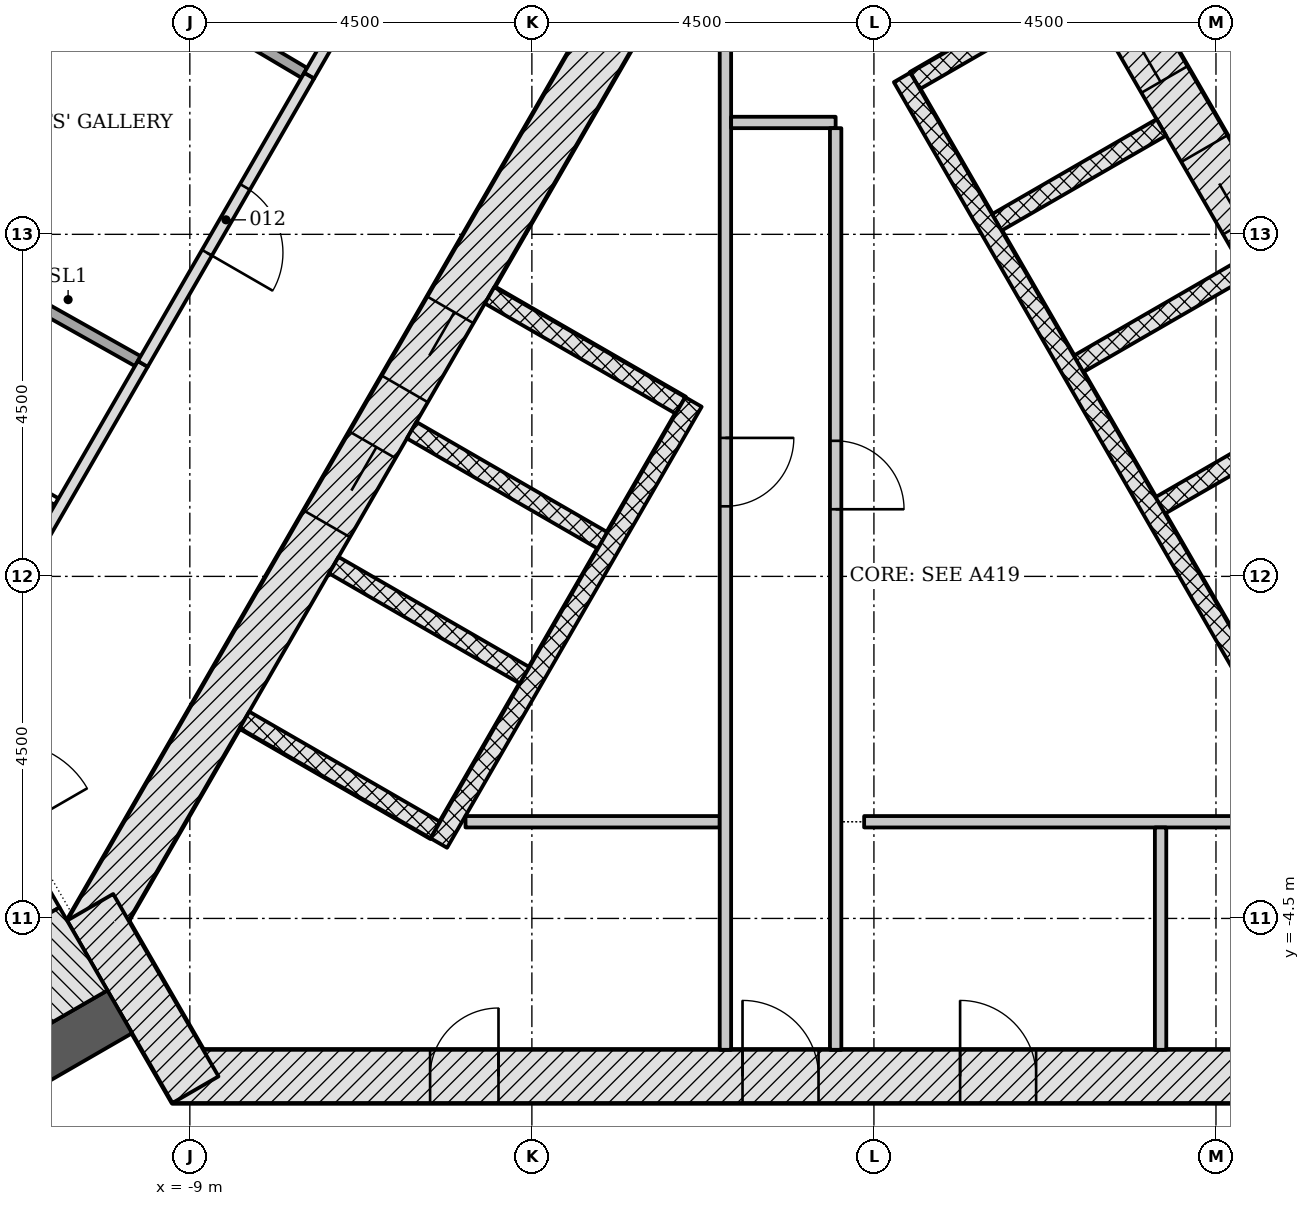
"""IFC4 building model, lengths in metres.
Left out: names, types, materials, properties, quantities, classifications, styles, units other than length and angle.
Written with IfcOpenShell. Run it as: python <this file> out.ifc"""

import sys

from ifc_helpers import new_model, si_unit, direction, frame, frame_2d, origin, place, context, subcontext, project, spatial, rectangle, extrude, element, fill, save


model = new_model("IFC4")
c1 = context("Model", 3, precision=1e-05, world=origin(), true_north=direction((0.0, 1.0)))
c2 = subcontext(c1, "Body", "Model", "MODEL_VIEW")
j1 = project(units=[si_unit("LENGTHUNIT", "METRE"), si_unit("PLANEANGLEUNIT", "RADIAN")], contexts=[c1])
p1 = place(None, origin())
s1 = spatial("IfcSite", under=j1, at=p1, CompositionType="ELEMENT")
p2 = place(p1, origin())
s2 = spatial("IfcBuilding", under=s1, at=p2, CompositionType="ELEMENT")
p3 = place(p2, frame((0.0, 0.0, 232.8)))
s3 = spatial("IfcBuildingStorey", under=s2, at=p3, CompositionType="ELEMENT", Elevation=232.8)
p4 = place(p3, frame((-9.229, -6.578, -0.2), z_axis=(0.0, 0.0, 1.0), x_axis=(1.0, 0.0, 0.0)))
e1 = element("IfcWall", 1, at=p4, inside=s3, PredefinedType="SHEAR", context=c2, shape_type="SweptSolid", body=[
    extrude(rectangle(XDim=18.458, YDim=0.7, at=frame_2d((9.229, 0.0))), origin(), (0.0, 0.0, 1.0), 3.6),
])
p5 = place(p4, frame((7.5, 0.0, 0.2)))
e2 = element("IfcOpeningElement", 2, at=p5, cuts=e1, PredefinedType="OPENING", context=c2, shape_type="SweptSolid", body=[
    extrude(rectangle(XDim=1.0, YDim=2.1, at=frame_2d((0.5, 1.05))), frame((0.0, 0.36, 0.0), z_axis=(0.0, -1.0, 0.0), x_axis=(1.0, 0.0, 0.0)), (0.0, 0.0, 1.0), 0.72),
])
p6 = place(p4, frame((3.389, 0.0, 0.2)))
e3 = element("IfcOpeningElement", 3, at=p6, cuts=e1, PredefinedType="OPENING", context=c2, shape_type="SweptSolid", body=[
    extrude(rectangle(XDim=0.9, YDim=2.1, at=frame_2d((0.45, 1.05))), frame((0.0, 0.36, 0.0), z_axis=(0.0, -1.0, 0.0), x_axis=(1.0, 0.0, 0.0)), (0.0, 0.0, 1.0), 0.72),
])
p7 = place(p4, frame((10.363, 0.0, 0.2)))
e4 = element("IfcOpeningElement", 4, at=p7, cuts=e1, PredefinedType="OPENING", context=c2, shape_type="SweptSolid", body=[
    extrude(rectangle(XDim=1.0, YDim=2.1, at=frame_2d((0.5, 1.05))), frame((0.0, 0.36, 0.0), z_axis=(0.0, -1.0, 0.0), x_axis=(1.0, 0.0, 0.0)), (0.0, 0.0, 1.0), 0.72),
])
p8 = place(p4, frame((15.077, 0.0, 0.2)))
e5 = element("IfcOpeningElement", 5, at=p8, cuts=e1, PredefinedType="OPENING", context=c2, shape_type="SweptSolid", body=[
    extrude(rectangle(XDim=0.9, YDim=2.1, at=frame_2d((0.45, 1.05))), frame((0.0, 0.36, 0.0), z_axis=(0.0, -1.0, 0.0), x_axis=(1.0, 0.0, 0.0)), (0.0, 0.0, 1.0), 0.72),
])
p9 = place(p3, frame((10.311, -4.703, -0.2), z_axis=(0.0, 0.0, 1.0), x_axis=(-0.500001446645, 0.866024568562, 0.0)))
e6 = element("IfcWall", 6, at=p9, inside=s3, PredefinedType="SHEAR", context=c2, shape_type="SweptSolid", body=[
    extrude(rectangle(XDim=18.458, YDim=0.7, at=frame_2d((9.229, 0.0))), origin(), (0.0, 0.0, 1.0), 3.6),
])
p10 = place(p9, frame((4.379, 0.0, 0.2)))
e7 = element("IfcOpeningElement", 7, at=p10, cuts=e6, PredefinedType="OPENING", context=c2, shape_type="SweptSolid", body=[
    extrude(rectangle(XDim=1.1, YDim=2.1, at=frame_2d((0.55, 1.05))), frame((0.0, 0.36, 0.0), z_axis=(0.0, -1.0, 0.0), x_axis=(1.0, 0.0, 0.0)), (0.0, 0.0, 1.0), 0.72),
])
p11 = place(p9, frame((6.529, 0.0, 0.2)))
e8 = element("IfcOpeningElement", 8, at=p11, cuts=e6, PredefinedType="OPENING", context=c2, shape_type="SweptSolid", body=[
    extrude(rectangle(XDim=1.1, YDim=2.1, at=frame_2d((0.55, 1.05))), frame((0.0, 0.36, 0.0), z_axis=(0.0, -1.0, 0.0), x_axis=(1.0, 0.0, 0.0)), (0.0, 0.0, 1.0), 0.72),
])
p12 = place(p9, frame((8.679, 0.0, 0.2)))
e9 = element("IfcOpeningElement", 9, at=p12, cuts=e6, PredefinedType="OPENING", context=c2, shape_type="SweptSolid", body=[
    extrude(rectangle(XDim=1.1, YDim=2.1, at=frame_2d((0.55, 1.05))), frame((0.0, 0.36, 0.0), z_axis=(0.0, -1.0, 0.0), x_axis=(1.0, 0.0, 0.0)), (0.0, 0.0, 1.0), 0.72),
])
p13 = place(p9, frame((10.829, 0.0, 0.2)))
e10 = element("IfcOpeningElement", 10, at=p13, cuts=e6, PredefinedType="OPENING", context=c2, shape_type="SweptSolid", body=[
    extrude(rectangle(XDim=1.1, YDim=2.1, at=frame_2d((0.55, 1.05))), frame((0.0, 0.36, 0.0), z_axis=(0.0, -1.0, 0.0), x_axis=(1.0, 0.0, 0.0)), (0.0, 0.0, 1.0), 0.72),
])
p14 = place(p9, frame((12.979, 0.0, 0.2)))
e11 = element("IfcOpeningElement", 11, at=p14, cuts=e6, PredefinedType="OPENING", context=c2, shape_type="SweptSolid", body=[
    extrude(rectangle(XDim=1.1, YDim=2.1, at=frame_2d((0.55, 1.05))), frame((0.0, 0.36, 0.0), z_axis=(0.0, -1.0, 0.0), x_axis=(1.0, 0.0, 0.0)), (0.0, 0.0, 1.0), 0.72),
])
p15 = place(p3, frame((-1.083, 11.281, -0.2), z_axis=(0.0, 0.0, 1.0), x_axis=(-0.500001446645, -0.866024568562, 0.0)))
e12 = element("IfcWall", 12, at=p15, inside=s3, PredefinedType="SHEAR", context=c2, shape_type="SweptSolid", body=[
    extrude(rectangle(XDim=18.458, YDim=0.7, at=frame_2d((9.229, 0.0))), origin(), (0.0, 0.0, 1.0), 3.6),
])
p16 = place(p15, frame((8.979, 0.0, 0.2)))
e13 = element("IfcOpeningElement", 13, at=p16, cuts=e12, PredefinedType="OPENING", context=c2, shape_type="SweptSolid", body=[
    extrude(rectangle(XDim=1.2, YDim=2.1, at=frame_2d((0.6, 1.05))), frame((0.0, 0.36, 0.0), z_axis=(0.0, -1.0, 0.0), x_axis=(1.0, 0.0, 0.0)), (0.0, 0.0, 1.0), 0.72),
])
p17 = place(p15, frame((11.029, 0.0, 0.2)))
e14 = element("IfcOpeningElement", 14, at=p17, cuts=e12, PredefinedType="OPENING", context=c2, shape_type="SweptSolid", body=[
    extrude(rectangle(XDim=1.2, YDim=2.1, at=frame_2d((0.6, 1.05))), frame((0.0, 0.36, 0.0), z_axis=(0.0, -1.0, 0.0), x_axis=(1.0, 0.0, 0.0)), (0.0, 0.0, 1.0), 0.72),
])
p18 = place(p3, frame((-10.311, -4.353, -0.2), z_axis=(0.0, 0.0, 1.0), x_axis=(0.500042739161, -0.866000726912, 0.0)))
e15 = element("IfcWall", 15, at=p18, inside=s3, PredefinedType="SHEAR", context=c2, shape_type="SweptSolid", body=[
    extrude(rectangle(XDim=2.771, YDim=0.7, at=frame_2d((1.386, 0.0))), origin(), (0.0, 0.0, 1.0), 3.6),
])
p19 = place(p3, frame((-9.922, -5.728, -0.2), z_axis=(0.0, 0.0, 1.0), x_axis=(-0.866026891245, -0.499997423634, 0.0)))
e16 = element("IfcWall", 16, at=p19, inside=s3, PredefinedType="SHEAR", context=c2, shape_type="SweptSolid", body=[
    extrude(rectangle(XDim=7.506, YDim=0.65, at=frame_2d((3.753, 0.0))), origin(), (0.0, 0.0, 1.0), 3.6),
])
p20 = place(p3, frame((5.931, 2.183, -0.2), z_axis=(0.0, 0.0, 1.0), x_axis=(-0.866047370643, -0.499961950354, 0.0)))
e17 = element("IfcWall", 17, at=p20, inside=s3, PredefinedType="PARTITIONING", context=c2, shape_type="SweptSolid", body=[
    extrude(rectangle(XDim=2.5, YDim=0.25, at=frame_2d((1.25, 0.0))), origin(), (0.0, 0.0, 1.0), 3.6),
])
for number, where, z_axis, x_axis in (
    (18, (4.856, 4.045, -0.2), (0.0, 0.0, 1.0), (-0.866, -0.5, 0.0)),
    (19, (3.781, 5.907, -0.2), (0.0, 0.0, 1.0), (-0.866, -0.5, 0.0)),
    (20, (2.706, 7.769, -0.2), (0.0, 0.0, 1.0), (-0.866, -0.5, 0.0)),
):
    element("IfcWall", number, at=place(p3, frame(where, z_axis=z_axis, x_axis=x_axis)), inside=s3, PredefinedType="PARTITIONING", context=c2, shape_type="SweptSolid", body=[
        extrude(rectangle(XDim=2.5, YDim=0.25, at=frame_2d((1.25, 0.0))), origin(), (0.0, 0.0, 1.0), 3.6),
    ])
p21 = place(p3, frame((5.87, -2.961, 0.0), z_axis=(0.0, 0.0, 1.0), x_axis=(-0.50000615651, 0.866021849293, 0.0)))
e21 = element("IfcWall", 21, at=p21, inside=s3, PredefinedType="PARTITIONING", context=c2, shape_type="SweptSolid", body=[
    extrude(rectangle(XDim=11.0, YDim=0.25, at=frame_2d((5.5, 0.0))), origin(), (0.0, 0.0, 1.0), 3.4),
])
for number, where, z_axis, x_axis in (
    (22, (-5.056, 3.699, -0.2), (0.0, 0.0, 1.0), (0.866, -0.5, 0.0)),
    (23, (-6.081, 1.923, -0.2), (0.0, 0.0, 1.0), (0.866, -0.5, 0.0)),
    (24, (-7.106, 0.148, -0.2), (0.0, 0.0, 1.0), (0.866, -0.5, 0.0)),
    (25, (-8.281, -1.887, -0.2), (0.0, 0.0, 1.0), (0.866, -0.5, 0.0)),
):
    element("IfcWall", number, at=place(p3, frame(where, z_axis=z_axis, x_axis=x_axis)), inside=s3, PredefinedType="PARTITIONING", context=c2, shape_type="SweptSolid", body=[
        extrude(rectangle(XDim=2.9, YDim=0.25, at=frame_2d((1.45, 0.0))), origin(), (0.0, 0.0, 1.0), 3.6),
    ])
p22 = place(p3, frame((-2.374, 2.294, 0.0), z_axis=(0.0, 0.0, 1.0), x_axis=(-0.500003174267, -0.866023571113, 0.0)))
e26 = element("IfcWall", 26, at=p22, inside=s3, PredefinedType="PARTITIONING", context=c2, shape_type="SweptSolid", body=[
    extrude(rectangle(XDim=6.7, YDim=0.25, at=frame_2d((3.35, 0.0))), origin(), (0.0, 0.0, 1.0), 3.4),
])
p23 = place(p3, frame((-5.373, -3.228, 0.0), z_axis=(0.0, 0.0, 1.0), x_axis=(1.0, 0.0, 0.0)))
e27 = element("IfcWall", 27, at=p23, inside=s3, PredefinedType="PARTITIONING", context=c2, shape_type="SweptSolid", body=[
    extrude(rectangle(XDim=3.344, YDim=0.15, at=frame_2d((1.672, 0.0))), origin(), (0.0, 0.0, 1.0), 3.4),
])
p24 = place(p3, frame((-1.954, 8.942, 0.0), z_axis=(0.0, 0.0, 1.0), x_axis=(0.0, -1.0, 0.0)))
e28 = element("IfcWall", 28, at=p24, inside=s3, PredefinedType="PARTITIONING", context=c2, shape_type="SweptSolid", body=[
    extrude(rectangle(XDim=15.171, YDim=0.15, at=frame_2d((7.585, 0.0))), origin(), (0.0, 0.0, 1.0), 3.4),
])
p25 = place(p24, frame((7.121, 0.0, 0.0)))
e29 = element("IfcOpeningElement", 29, at=p25, cuts=e28, PredefinedType="OPENING", context=c2, shape_type="SweptSolid", body=[
    extrude(rectangle(XDim=0.9, YDim=2.1, at=frame_2d((0.45, 1.05))), frame((0.0, 0.085, 0.0), z_axis=(0.0, -1.0, 0.0), x_axis=(1.0, 0.0, 0.0)), (0.0, 0.0, 1.0), 0.17),
])
p26 = place(p3, frame((-1.879, 5.972, 0.0), z_axis=(0.0, 0.0, 1.0), x_axis=(1.0, 0.0, 0.0)))
e30 = element("IfcWall", 30, at=p26, inside=s3, PredefinedType="PARTITIONING", context=c2, shape_type="SweptSolid", body=[
    extrude(rectangle(XDim=1.375, YDim=0.15, at=frame_2d((0.688, 0.0))), origin(), (0.0, 0.0, 1.0), 3.4),
])
p27 = place(p3, frame((-0.504, 5.897, 0.0), z_axis=(0.0, 0.0, 1.0), x_axis=(0.0, -1.0, 0.0)))
e31 = element("IfcWall", 31, at=p27, inside=s3, PredefinedType="PARTITIONING", context=c2, shape_type="SweptSolid", body=[
    extrude(rectangle(XDim=12.125, YDim=0.15, at=frame_2d((6.062, 0.0))), origin(), (0.0, 0.0, 1.0), 3.4),
])
p28 = place(p27, frame((4.114, 0.0, 0.0)))
e32 = element("IfcOpeningElement", 32, at=p28, cuts=e31, PredefinedType="OPENING", context=c2, shape_type="SweptSolid", body=[
    extrude(rectangle(XDim=0.9, YDim=2.1, at=frame_2d((0.45, 1.05))), frame((0.0, 0.085, 0.0), z_axis=(0.0, -1.0, 0.0), x_axis=(1.0, 0.0, 0.0)), (0.0, 0.0, 1.0), 0.17),
])
p29 = place(p3, frame((-0.129, -3.228, 0.0), z_axis=(0.0, 0.0, 1.0), x_axis=(1.0, 0.0, 0.0)))
e33 = element("IfcWall", 33, at=p29, inside=s3, PredefinedType="PARTITIONING", context=c2, shape_type="SweptSolid", body=[
    extrude(rectangle(XDim=9.139, YDim=0.15, at=frame_2d((4.57, 0.0))), origin(), (0.0, 0.0, 1.0), 3.4),
])
p30 = place(p3, frame((3.771, -3.303, 0.0), z_axis=(0.0, 0.0, 1.0), x_axis=(0.0, -1.0, 0.0)))
e34 = element("IfcWall", 34, at=p30, inside=s3, PredefinedType="PARTITIONING", context=c2, shape_type="SweptSolid", body=[
    extrude(rectangle(XDim=2.925, YDim=0.15, at=frame_2d((1.462, 0.0))), origin(), (0.0, 0.0, 1.0), 3.4),
])
p31 = place(p3, frame((-12.576, -1.331, -0.2), z_axis=(0.0, 0.0, 1.0), x_axis=(0.499970499736, -0.8660424351, 0.0)))
e35 = element("IfcWall", 35, at=p31, inside=s3, PredefinedType="SHEAR", context=c2, shape_type="SweptSolid", body=[
    extrude(rectangle(XDim=3.55, YDim=0.2, at=frame_2d((1.775, 0.0))), origin(), (0.0, 0.0, 1.0), 3.6),
])
p32 = place(p31, frame((1.175, 0.0, 0.2)))
e36 = element("IfcOpeningElement", 36, at=p32, cuts=e35, PredefinedType="OPENING", context=c2, shape_type="SweptSolid", body=[
    extrude(rectangle(XDim=1.2, YDim=2.1, at=frame_2d((0.6, 1.05))), frame((0.0, 0.11, 0.0), z_axis=(0.0, -1.0, 0.0), x_axis=(1.0, 0.0, 0.0)), (0.0, 0.0, 1.0), 0.22),
])
p33 = place(p3, frame((-10.399, -4.901, -0.2), z_axis=(0.0, 0.0, 1.0), x_axis=(-0.866020939036, -0.500007733091, 0.0)))
e37 = element("IfcWall", 37, at=p33, inside=s3, PredefinedType="SHEAR", context=c2, shape_type="SweptSolid", body=[
    extrude(rectangle(XDim=7.507, YDim=1.261, at=frame_2d((3.753, 0.0))), origin(), (0.0, 0.0, 1.0), 3.6),
])
p34 = place(p3, frame((6.886, 6.729, 0.0), z_axis=(0.0, 0.0, 1.0), x_axis=(-0.4999966759, 0.866027322946, 0.0)))
e38 = element("IfcWall", 38, at=p34, inside=s3, PredefinedType="PARTITIONING", context=c2, shape_type="SweptSolid", body=[
    extrude(rectangle(XDim=5.343, YDim=0.15, at=frame_2d((2.672, 0.0))), origin(), (0.0, 0.0, 1.0), 2.852),
])
p35 = place(p3, frame((-0.545, 18.513, 0.0), z_axis=(0.0, 0.0, 1.0), x_axis=(-0.499998165157, -0.866026463129, 0.0)))
e39 = element("IfcWall", 39, at=p35, inside=s3, PredefinedType="PARTITIONING", context=c2, shape_type="SweptSolid", body=[
    extrude(rectangle(XDim=13.771, YDim=0.15, at=frame_2d((6.886, 0.0))), origin(), (0.0, 0.0, 1.0), 2.852),
])
p36 = place(p3, frame((-9.619, 2.795, 0.0), z_axis=(0.0, 0.0, 1.0), x_axis=(-0.499963809755, -0.866046297224, 0.0)))
e40 = element("IfcWall", 40, at=p36, inside=s3, PredefinedType="PARTITIONING", context=c2, shape_type="SweptSolid", body=[
    extrude(rectangle(XDim=5.108, YDim=0.15, at=frame_2d((2.554, 0.0))), origin(), (0.0, 0.0, 1.0), 2.852),
])
p37 = place(p3, frame((-11.472, 8.981, 0.0), z_axis=(0.0, 0.0, 1.0), x_axis=(0.860336137803, -0.509727113257, 0.0)))
e41 = element("IfcWall", 41, at=p37, inside=s3, PredefinedType="PARTITIONING", context=c2, shape_type="SweptSolid", body=[
    extrude(rectangle(XDim=4.623, YDim=0.15, at=frame_2d((2.312, 0.0))), origin(), (0.0, 0.0, 1.0), 3.4),
])
p38 = place(p37, frame((1.849, 0.0, 0.0)))
e42 = element("IfcOpeningElement", 42, at=p38, cuts=e41, PredefinedType="OPENING", context=c2, shape_type="SweptSolid", body=[
    extrude(rectangle(XDim=1.0, YDim=2.1, at=frame_2d((0.5, 1.05))), frame((0.0, 0.085, 0.0), z_axis=(0.0, -1.0, 0.0), x_axis=(1.0, 0.0, 0.0)), (0.0, 0.0, 1.0), 0.17),
])
p39 = place(p3, frame((-13.71, 5.096, 0.0), z_axis=(0.0, 0.0, 1.0), x_axis=(0.871644704197, -0.490138255644, 0.0)))
e43 = element("IfcWall", 43, at=p39, inside=s3, PredefinedType="PARTITIONING", context=c2, shape_type="SweptSolid", body=[
    extrude(rectangle(XDim=4.618, YDim=0.15, at=frame_2d((2.309, 0.0))), origin(), (0.0, 0.0, 1.0), 3.4),
])
p40 = place(p39, frame((0.247, 0.0, 0.0)))
e44 = element("IfcOpeningElement", 44, at=p40, cuts=e43, PredefinedType="OPENING", context=c2, shape_type="SweptSolid", body=[
    extrude(rectangle(XDim=1.0, YDim=2.1, at=frame_2d((0.5, 1.05))), frame((0.0, 0.085, 0.0), z_axis=(0.0, -1.0, 0.0), x_axis=(1.0, 0.0, 0.0)), (0.0, 0.0, 1.0), 0.17),
])
p41 = place(p3, frame((-7.43, 6.586, 0.0), z_axis=(0.0, 0.0, 1.0), x_axis=(-0.500037854553, -0.866003547345, 0.0)))
e45 = element("IfcWall", 45, at=p41, inside=s3, PredefinedType="PARTITIONING", context=c2, shape_type="SweptSolid", body=[
    extrude(rectangle(XDim=4.378, YDim=0.15, at=frame_2d((2.189, 0.0))), origin(), (0.0, 0.0, 1.0), 2.852),
])
p42 = place(p41, frame((1.689, 0.0, 0.0)))
e46 = element("IfcOpeningElement", 46, at=p42, cuts=e45, PredefinedType="OPENING", context=c2, shape_type="SweptSolid", body=[
    extrude(rectangle(XDim=1.0, YDim=2.1, at=frame_2d((0.5, 1.05))), frame((0.0, 0.085, 0.0), z_axis=(0.0, -1.0, 0.0), x_axis=(1.0, 0.0, 0.0)), (0.0, 0.0, 1.0), 0.17),
])
p43 = place(p3, frame((-13.415, 2.52, 0.0), z_axis=(0.0, 0.0, 1.0), x_axis=(0.865996501658, -0.50005005661, 0.0)))
e47 = element("IfcWall", 47, at=p43, inside=s3, PredefinedType="PARTITIONING", context=c2, shape_type="SweptSolid", body=[
    extrude(rectangle(XDim=3.075, YDim=0.1, at=frame_2d((1.538, 0.0))), origin(), (0.0, 0.0, 1.0), 3.4),
])
p44 = place(p43, frame((1.05, 0.0, 0.0)))
e48 = element("IfcOpeningElement", 48, at=p44, cuts=e47, PredefinedType="OPENING", context=c2, shape_type="SweptSolid", body=[
    extrude(rectangle(XDim=1.0, YDim=2.1, at=frame_2d((0.5, 1.05))), frame((0.0, 0.06, 0.0), z_axis=(0.0, -1.0, 0.0), x_axis=(1.0, 0.0, 0.0)), (0.0, 0.0, 1.0), 0.12),
])
p45 = place(p13, origin())
e49 = element("IfcDoor", 49, at=p45, inside=s3, OperationType="DOUBLE_DOOR_SLIDING", PredefinedType="DOOR", context=c2, shape_type="SweptSolid", body=[
    extrude(rectangle(XDim=1.1, YDim=2.1, at=frame_2d((0.55, 1.05))), frame((0.0, 0.025, 0.0), z_axis=(0.0, -1.0, 0.0), x_axis=(1.0, 0.0, 0.0)), (0.0, 0.0, 1.0), 0.05),
])
fill(e10, e49)
p46 = place(p14, origin())
e50 = element("IfcDoor", 50, at=p46, inside=s3, OperationType="DOUBLE_DOOR_SLIDING", PredefinedType="DOOR", context=c2, shape_type="SweptSolid", body=[
    extrude(rectangle(XDim=1.1, YDim=2.1, at=frame_2d((0.55, 1.05))), frame((0.0, 0.025, 0.0), z_axis=(0.0, -1.0, 0.0), x_axis=(1.0, 0.0, 0.0)), (0.0, 0.0, 1.0), 0.05),
])
fill(e11, e50)
p47 = place(p16, origin())
e51 = element("IfcDoor", 51, at=p47, inside=s3, OperationType="DOUBLE_DOOR_SLIDING", PredefinedType="DOOR", context=c2, shape_type="SweptSolid", body=[
    extrude(rectangle(XDim=1.2, YDim=2.1, at=frame_2d((0.6, 1.05))), frame((0.0, 0.025, 0.0), z_axis=(0.0, -1.0, 0.0), x_axis=(1.0, 0.0, 0.0)), (0.0, 0.0, 1.0), 0.05),
])
fill(e13, e51)
p48 = place(p17, origin())
e52 = element("IfcDoor", 52, at=p48, inside=s3, OperationType="DOUBLE_DOOR_SLIDING", PredefinedType="DOOR", context=c2, shape_type="SweptSolid", body=[
    extrude(rectangle(XDim=1.2, YDim=2.1, at=frame_2d((0.6, 1.05))), frame((0.0, 0.025, 0.0), z_axis=(0.0, -1.0, 0.0), x_axis=(1.0, 0.0, 0.0)), (0.0, 0.0, 1.0), 0.05),
])
fill(e14, e52)
p49 = place(p5, origin())
e53 = element("IfcDoor", 53, at=p49, inside=s3, OperationType="SINGLE_SWING_LEFT", PredefinedType="DOOR", context=c2, shape_type="SweptSolid", body=[
    extrude(rectangle(XDim=1.0, YDim=2.1, at=frame_2d((0.5, 1.05))), frame((0.0, 0.075, 0.0), z_axis=(0.0, -1.0, 0.0), x_axis=(1.0, 0.0, 0.0)), (0.0, 0.0, 1.0), 0.15),
])
fill(e2, e53)
p50 = place(p6, origin())
e54 = element("IfcDoor", 54, at=p50, inside=s3, OperationType="SINGLE_SWING_RIGHT", PredefinedType="DOOR", context=c2, shape_type="SweptSolid", body=[
    extrude(rectangle(XDim=0.9, YDim=2.1, at=frame_2d((0.45, 1.05))), frame((0.0, 0.075, 0.0), z_axis=(0.0, -1.0, 0.0), x_axis=(1.0, 0.0, 0.0)), (0.0, 0.0, 1.0), 0.15),
])
fill(e3, e54)
p51 = place(p7, origin())
e55 = element("IfcDoor", 55, at=p51, inside=s3, OperationType="SINGLE_SWING_LEFT", PredefinedType="DOOR", context=c2, shape_type="SweptSolid", body=[
    extrude(rectangle(XDim=1.0, YDim=2.1, at=frame_2d((0.5, 1.05))), frame((0.0, 0.075, 0.0), z_axis=(0.0, -1.0, 0.0), x_axis=(1.0, 0.0, 0.0)), (0.0, 0.0, 1.0), 0.15),
])
fill(e4, e55)
p52 = place(p25, origin())
e56 = element("IfcDoor", 56, at=p52, inside=s3, OperationType="SINGLE_SWING_LEFT", PredefinedType="DOOR", context=c2, shape_type="SweptSolid", body=[
    extrude(rectangle(XDim=0.9, YDim=2.1, at=frame_2d((0.45, 1.05))), frame((0.0, 0.025, 0.0), z_axis=(0.0, -1.0, 0.0), x_axis=(1.0, 0.0, 0.0)), (0.0, 0.0, 1.0), 0.05),
])
fill(e29, e56)
p53 = place(p28, origin())
e57 = element("IfcDoor", 57, at=p53, inside=s3, OperationType="SINGLE_SWING_RIGHT", PredefinedType="DOOR", context=c2, shape_type="SweptSolid", body=[
    extrude(rectangle(XDim=0.9, YDim=2.1, at=frame_2d((0.45, 1.05))), frame((0.0, 0.025, 0.0), z_axis=(0.0, -1.0, 0.0), x_axis=(1.0, 0.0, 0.0)), (0.0, 0.0, 1.0), 0.05),
])
fill(e32, e57)
p54 = place(p42, origin())
e58 = element("IfcDoor", 58, at=p54, inside=s3, OperationType="SINGLE_SWING_RIGHT", PredefinedType="DOOR", context=c2, shape_type="SweptSolid", body=[
    extrude(rectangle(XDim=1.0, YDim=2.1, at=frame_2d((0.5, 1.05))), frame((0.0, 0.025, 0.0), z_axis=(0.0, -1.0, 0.0), x_axis=(1.0, 0.0, 0.0)), (0.0, 0.0, 1.0), 0.05),
])
fill(e46, e58)
save(model, sys.argv[1])
